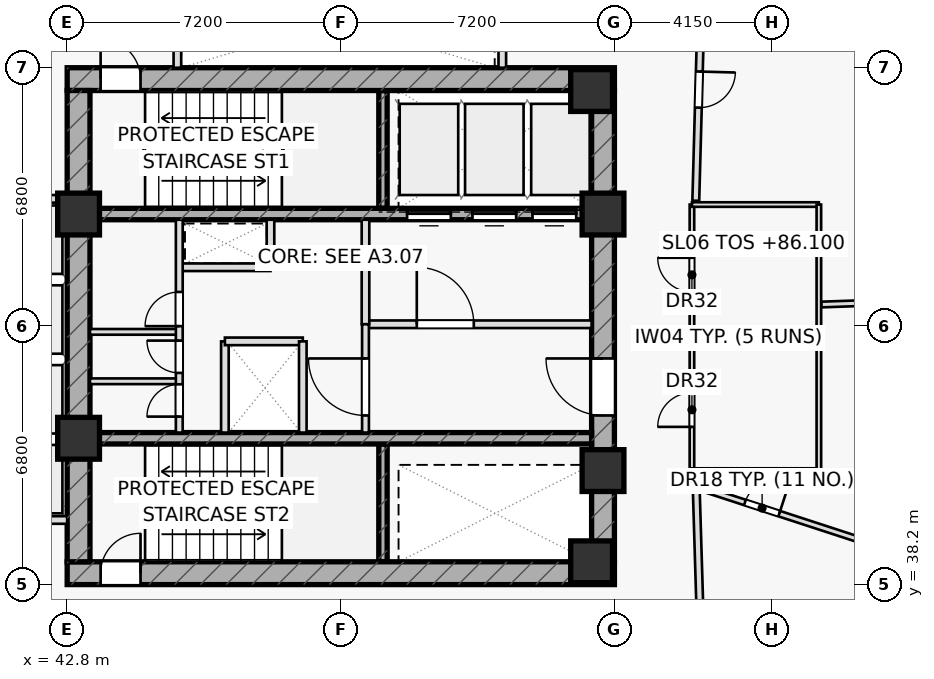
"""IFC4 building model, lengths in metres.
Left out: names, types, materials, properties, quantities, classifications, styles, units other than length and angle.
Written with IfcOpenShell. Run it as: python <this file> out.ifc"""

import sys

from ifc_helpers import new_model, si_unit, direction, frame, frame_2d, origin, origin_2d, place, context, subcontext, project, spatial, rectangle, extrude, element, fill, save


model = new_model("IFC4")
c1 = context("Model", 3, precision=1e-05, world=origin(), true_north=direction((0.0, 1.0)))
c2 = subcontext(c1, "Body", "Model", "MODEL_VIEW")
j1 = project(units=[si_unit("LENGTHUNIT", "METRE"), si_unit("PLANEANGLEUNIT", "RADIAN")], contexts=[c1])
p1 = place(None, origin())
s1 = spatial("IfcSite", under=j1, at=p1, CompositionType="ELEMENT")
p2 = place(p1, origin())
s2 = spatial("IfcBuilding", under=s1, at=p2, CompositionType="ELEMENT")
p3 = place(p2, frame((0.0, 0.0, 86.1)))
s3 = spatial("IfcBuildingStorey", under=s2, at=p3, CompositionType="ELEMENT", Elevation=86.1)
for number, where, z_axis, x_axis in (
    (1, (51.11, 48.1, 0.0), (0.0, 0.0, 1.0), (0.0, 1.0, 0.0)),
    (2, (51.11, 38.8, 0.0), (0.0, 0.0, 1.0), (0.0, 1.0, 0.0)),
):
    element("IfcWall", number, at=place(p3, frame(where, z_axis=z_axis, x_axis=x_axis)), inside=s3, PredefinedType="SHEAR", context=c2, shape_type="SweptSolid", body=[
        extrude(rectangle(XDim=3.1, YDim=0.22, at=frame_2d((1.55, 0.0))), origin(), (0.0, 0.0, 1.0), 3.6),
    ])
p4 = place(p3, frame((42.8, 51.5, 0.0), z_axis=(0.0, 0.0, 1.0), x_axis=(1.0, 0.0, 0.0)))
e3 = element("IfcWall", 3, at=p4, inside=s3, PredefinedType="SHEAR", context=c2, shape_type="SweptSolid", body=[
    extrude(rectangle(XDim=14.4, YDim=0.6, at=frame_2d((7.2, 0.0))), origin(), (0.0, 0.0, 1.0), 3.6),
])
p5 = place(p4, frame((0.88, 0.0, 0.0)))
e4 = element("IfcOpeningElement", 4, at=p5, cuts=e3, PredefinedType="OPENING", context=c2, shape_type="SweptSolid", body=[
    extrude(rectangle(XDim=1.05, YDim=2.2, at=frame_2d((0.525, 1.1))), frame((0.0, 0.31, 0.0), z_axis=(0.0, -1.0, 0.0), x_axis=(1.0, 0.0, 0.0)), (0.0, 0.0, 1.0), 0.62),
])
p6 = place(p3, frame((42.8, 38.5, 0.0), z_axis=(0.0, 0.0, 1.0), x_axis=(1.0, 0.0, 0.0)))
e5 = element("IfcWall", 5, at=p6, inside=s3, PredefinedType="SHEAR", context=c2, shape_type="SweptSolid", body=[
    extrude(rectangle(XDim=14.4, YDim=0.6, at=frame_2d((7.2, 0.0))), origin(), (0.0, 0.0, 1.0), 3.6),
])
p7 = place(p6, frame((0.88, 0.0, 0.0)))
e6 = element("IfcOpeningElement", 6, at=p7, cuts=e5, PredefinedType="OPENING", context=c2, shape_type="SweptSolid", body=[
    extrude(rectangle(XDim=1.05, YDim=2.2, at=frame_2d((0.525, 1.1))), frame((0.0, 0.31, 0.0), z_axis=(0.0, -1.0, 0.0), x_axis=(1.0, 0.0, 0.0)), (0.0, 0.0, 1.0), 0.62),
])
p8 = place(p3, frame((43.1, 38.8, 0.0), z_axis=(0.0, 0.0, 1.0), x_axis=(0.0, 1.0, 0.0)))
e7 = element("IfcWall", 7, at=p8, inside=s3, PredefinedType="SHEAR", context=c2, shape_type="SweptSolid", body=[
    extrude(rectangle(XDim=12.4, YDim=0.6, at=frame_2d((6.2, 0.0))), origin(), (0.0, 0.0, 1.0), 3.6),
])
p9 = place(p3, frame((56.9, 38.8, 0.0), z_axis=(0.0, 0.0, 1.0), x_axis=(0.0, 1.0, 0.0)))
e8 = element("IfcWall", 8, at=p9, inside=s3, PredefinedType="SHEAR", context=c2, shape_type="SweptSolid", body=[
    extrude(rectangle(XDim=12.4, YDim=0.6, at=frame_2d((6.2, 0.0))), origin(), (0.0, 0.0, 1.0), 3.6),
])
p10 = place(p9, frame((3.85, 0.0, 0.0)))
e9 = element("IfcOpeningElement", 9, at=p10, cuts=e8, PredefinedType="OPENING", context=c2, shape_type="SweptSolid", body=[
    extrude(rectangle(XDim=1.5, YDim=2.2, at=frame_2d((0.75, 1.1))), frame((0.0, 0.31, 0.0), z_axis=(0.0, -1.0, 0.0), x_axis=(1.0, 0.0, 0.0)), (0.0, 0.0, 1.0), 0.62),
])
p11 = place(p3, frame((43.4, 47.95, 0.0), z_axis=(0.0, 0.0, 1.0), x_axis=(1.0, 0.0, 0.0)))
e10 = element("IfcWall", 10, at=p11, inside=s3, PredefinedType="SHEAR", context=c2, shape_type="SweptSolid", body=[
    extrude(rectangle(XDim=13.2, YDim=0.3, at=frame_2d((6.6, 0.0))), origin(), (0.0, 0.0, 1.0), 3.6),
])
p12 = place(p11, frame((8.345, 0.0, 0.0)))
e11 = element("IfcOpeningElement", 11, at=p12, cuts=e10, PredefinedType="OPENING", context=c2, shape_type="SweptSolid", body=[
    extrude(rectangle(XDim=1.15, YDim=2.2, at=frame_2d((0.575, 1.1))), frame((0.0, 0.16, 0.0), z_axis=(0.0, -1.0, 0.0), x_axis=(1.0, 0.0, 0.0)), (0.0, 0.0, 1.0), 0.32),
])
p13 = place(p11, frame((10.065, 0.0, 0.0)))
e12 = element("IfcOpeningElement", 12, at=p13, cuts=e10, PredefinedType="OPENING", context=c2, shape_type="SweptSolid", body=[
    extrude(rectangle(XDim=1.15, YDim=2.2, at=frame_2d((0.575, 1.1))), frame((0.0, 0.16, 0.0), z_axis=(0.0, -1.0, 0.0), x_axis=(1.0, 0.0, 0.0)), (0.0, 0.0, 1.0), 0.32),
])
p14 = place(p11, frame((11.645, 0.0, 0.0)))
e13 = element("IfcOpeningElement", 13, at=p14, cuts=e10, PredefinedType="OPENING", context=c2, shape_type="SweptSolid", body=[
    extrude(rectangle(XDim=1.15, YDim=2.2, at=frame_2d((0.575, 1.1))), frame((0.0, 0.16, 0.0), z_axis=(0.0, -1.0, 0.0), x_axis=(1.0, 0.0, 0.0)), (0.0, 0.0, 1.0), 0.32),
])
p15 = place(p3, frame((43.4, 42.05, 0.0), z_axis=(0.0, 0.0, 1.0), x_axis=(1.0, 0.0, 0.0)))
e14 = element("IfcWall", 14, at=p15, inside=s3, PredefinedType="SHEAR", context=c2, shape_type="SweptSolid", body=[
    extrude(rectangle(XDim=13.2, YDim=0.3, at=frame_2d((6.6, 0.0))), origin(), (0.0, 0.0, 1.0), 3.6),
])
for number, where, z_axis, x_axis in (
    (15, (43.1, 47.95, 0.0), (0.0, 0.0, 1.0), (1.0, 0.0, 0.0)),
    (16, (56.9, 47.95, 0.0), (0.0, 0.0, 1.0), (1.0, 0.0, 0.0)),
    (17, (56.6, 51.2, 0.0), (0.0, 0.0, 1.0), (1.0, 0.0, 0.0)),
    (18, (43.1, 42.05, 0.0), (0.0, 0.0, 1.0), (1.0, 0.0, 0.0)),
    (19, (56.9, 41.2, 0.0), (0.0, 0.0, 1.0), (1.0, 0.0, 0.0)),
    (20, (56.6, 38.8, 0.0), (0.0, 0.0, 1.0), (1.0, 0.0, 0.0)),
):
    element("IfcColumn", number, at=place(p3, frame(where, z_axis=z_axis, x_axis=x_axis)), inside=s3, PredefinedType="COLUMN", context=c2, shape_type="SweptSolid", body=[
        extrude(rectangle(XDim=1.1, YDim=1.1, at=origin_2d()), origin(), (0.0, 0.0, 1.0), 3.6),
    ])
for number, where, z_axis, x_axis in (
    (21, (40.3, 39.9, 0.0), (0.0, 0.0, 1.0), (1.0, 0.0, 0.0)),
    (22, (40.3, 48.35, 0.0), (0.0, 0.0, 1.0), (1.0, 0.0, 0.0)),
    (23, (45.7, 51.8, 0.0), (0.0, 0.0, 1.0), (0.0, 1.0, 0.0)),
    (24, (54.25, 51.8, 0.0), (0.0, 0.0, 1.0), (0.0, 1.0, 0.0)),
):
    element("IfcWall", number, at=place(p3, frame(where, z_axis=z_axis, x_axis=x_axis)), inside=s3, PredefinedType="PARTITIONING", context=c2, shape_type="SweptSolid", body=[
        extrude(rectangle(XDim=2.5, YDim=0.2, at=frame_2d((1.25, 0.0))), origin(), (0.0, 0.0, 1.0), 3.6),
    ])
p16 = place(p3, frame((45.75, 46.55, 0.0), z_axis=(0.0, 0.0, 1.0), x_axis=(1.0, 0.0, 0.0)))
e25 = element("IfcWall", 25, at=p16, inside=s3, PredefinedType="PARTITIONING", context=c2, shape_type="SweptSolid", body=[
    extrude(rectangle(XDim=2.4, YDim=0.2, at=frame_2d((1.2, 0.0))), origin(), (0.0, 0.0, 1.0), 3.6),
])
p17 = place(p3, frame((48.15, 46.55, 0.0), z_axis=(0.0, 0.0, 1.0), x_axis=(0.0, 1.0, 0.0)))
e26 = element("IfcWall", 26, at=p17, inside=s3, PredefinedType="PARTITIONING", context=c2, shape_type="SweptSolid", body=[
    extrude(rectangle(XDim=1.25, YDim=0.2, at=frame_2d((0.625, 0.0))), origin(), (0.0, 0.0, 1.0), 3.6),
])
p18 = place(p3, frame((46.95, 42.2, 0.0), z_axis=(0.0, 0.0, 1.0), x_axis=(0.0, 1.0, 0.0)))
e27 = element("IfcWall", 27, at=p18, inside=s3, PredefinedType="PARTITIONING", context=c2, shape_type="SweptSolid", body=[
    extrude(rectangle(XDim=2.4, YDim=0.2, at=frame_2d((1.2, 0.0))), origin(), (0.0, 0.0, 1.0), 3.6),
])
p19 = place(p3, frame((46.95, 44.6, 0.0), z_axis=(0.0, 0.0, 1.0), x_axis=(1.0, 0.0, 0.0)))
e28 = element("IfcWall", 28, at=p19, inside=s3, PredefinedType="PARTITIONING", context=c2, shape_type="SweptSolid", body=[
    extrude(rectangle(XDim=2.05, YDim=0.2, at=frame_2d((1.025, 0.0))), origin(), (0.0, 0.0, 1.0), 3.6),
])
p20 = place(p3, frame((50.65, 45.05, 0.0), z_axis=(0.0, 0.0, 1.0), x_axis=(1.0, 0.0, 0.0)))
e29 = element("IfcWall", 29, at=p20, inside=s3, PredefinedType="PARTITIONING", context=c2, shape_type="SweptSolid", body=[
    extrude(rectangle(XDim=5.95, YDim=0.2, at=frame_2d((2.975, 0.0))), origin(), (0.0, 0.0, 1.0), 3.6),
])
p21 = place(p20, frame((1.35, 0.0, 0.0)))
e30 = element("IfcOpeningElement", 30, at=p21, cuts=e29, PredefinedType="OPENING", context=c2, shape_type="SweptSolid", body=[
    extrude(rectangle(XDim=1.5, YDim=2.2, at=frame_2d((0.75, 1.1))), frame((0.0, 0.11, 0.0), z_axis=(0.0, -1.0, 0.0), x_axis=(1.0, 0.0, 0.0)), (0.0, 0.0, 1.0), 0.22),
])
p22 = place(p3, frame((50.65, 45.05, 0.0), z_axis=(0.0, 0.0, 1.0), x_axis=(0.0, 1.0, 0.0)))
e31 = element("IfcWall", 31, at=p22, inside=s3, PredefinedType="PARTITIONING", context=c2, shape_type="SweptSolid", body=[
    extrude(rectangle(XDim=2.75, YDim=0.2, at=frame_2d((1.375, 0.0))), origin(), (0.0, 0.0, 1.0), 3.6),
])
p23 = place(p3, frame((50.65, 42.2, 0.0), z_axis=(0.0, 0.0, 1.0), x_axis=(0.0, 1.0, 0.0)))
e32 = element("IfcWall", 32, at=p23, inside=s3, PredefinedType="PARTITIONING", context=c2, shape_type="SweptSolid", body=[
    extrude(rectangle(XDim=2.85, YDim=0.18, at=frame_2d((1.425, 0.0))), origin(), (0.0, 0.0, 1.0), 3.6),
])
p24 = place(p23, frame((0.45, 0.0, 0.0)))
e33 = element("IfcOpeningElement", 33, at=p24, cuts=e32, PredefinedType="OPENING", context=c2, shape_type="SweptSolid", body=[
    extrude(rectangle(XDim=1.5, YDim=2.2, at=frame_2d((0.75, 1.1))), frame((0.0, 0.1, 0.0), z_axis=(0.0, -1.0, 0.0), x_axis=(1.0, 0.0, 0.0)), (0.0, 0.0, 1.0), 0.2),
])
for number, where, z_axis, x_axis in (
    (34, (43.4, 43.55, 0.0), (0.0, 0.0, 1.0), (1.0, 0.0, 0.0)),
    (35, (43.4, 44.85, 0.0), (0.0, 0.0, 1.0), (1.0, 0.0, 0.0)),
):
    element("IfcWall", number, at=place(p3, frame(where, z_axis=z_axis, x_axis=x_axis)), inside=s3, PredefinedType="PARTITIONING", context=c2, shape_type="SweptSolid", body=[
        extrude(rectangle(XDim=2.35, YDim=0.15, at=frame_2d((1.175, 0.0))), origin(), (0.0, 0.0, 1.0), 3.6),
    ])
p25 = place(p3, frame((45.75, 42.2, 0.0), z_axis=(0.0, 0.0, 1.0), x_axis=(0.0, 1.0, 0.0)))
e36 = element("IfcWall", 36, at=p25, inside=s3, PredefinedType="PARTITIONING", context=c2, shape_type="SweptSolid", body=[
    extrude(rectangle(XDim=5.6, YDim=0.18, at=frame_2d((2.8, 0.0))), origin(), (0.0, 0.0, 1.0), 3.6),
])
p26 = place(p25, frame((0.42, 0.0, 0.0)))
e37 = element("IfcOpeningElement", 37, at=p26, cuts=e36, PredefinedType="OPENING", context=c2, shape_type="SweptSolid", body=[
    extrude(rectangle(XDim=0.85, YDim=2.05, at=frame_2d((0.425, 1.025))), frame((0.0, 0.1, 0.0), z_axis=(0.0, -1.0, 0.0), x_axis=(1.0, 0.0, 0.0)), (0.0, 0.0, 1.0), 0.2),
])
p27 = place(p25, frame((1.57, 0.0, 0.0)))
e38 = element("IfcOpeningElement", 38, at=p27, cuts=e36, PredefinedType="OPENING", context=c2, shape_type="SweptSolid", body=[
    extrude(rectangle(XDim=0.85, YDim=2.05, at=frame_2d((0.425, 1.025))), frame((0.0, 0.1, 0.0), z_axis=(0.0, -1.0, 0.0), x_axis=(1.0, 0.0, 0.0)), (0.0, 0.0, 1.0), 0.2),
])
p28 = place(p25, frame((2.8, 0.0, 0.0)))
e39 = element("IfcOpeningElement", 39, at=p28, cuts=e36, PredefinedType="OPENING", context=c2, shape_type="SweptSolid", body=[
    extrude(rectangle(XDim=0.9, YDim=2.05, at=frame_2d((0.45, 1.025))), frame((0.0, 0.1, 0.0), z_axis=(0.0, -1.0, 0.0), x_axis=(1.0, 0.0, 0.0)), (0.0, 0.0, 1.0), 0.2),
])
p29 = place(p3, frame((59.24, 41.2, 0.0), z_axis=(0.0, 0.0, 1.0), x_axis=(0.0, 1.0, 0.0)))
e40 = element("IfcWall", 40, at=p29, inside=s3, PredefinedType="PARTITIONING", context=c2, shape_type="SweptSolid", body=[
    extrude(rectangle(XDim=7.0, YDim=0.12, at=frame_2d((3.5, 0.0))), origin(), (0.0, 0.0, 1.0), 3.6),
])
p30 = place(p29, frame((1.15, 0.0, 0.0)))
e41 = element("IfcOpeningElement", 41, at=p30, cuts=e40, PredefinedType="OPENING", context=c2, shape_type="SweptSolid", body=[
    extrude(rectangle(XDim=0.9, YDim=2.05, at=frame_2d((0.45, 1.025))), frame((0.0, 0.07, 0.0), z_axis=(0.0, -1.0, 0.0), x_axis=(1.0, 0.0, 0.0)), (0.0, 0.0, 1.0), 0.14),
])
p31 = place(p29, frame((4.7, 0.0, 0.0)))
e42 = element("IfcOpeningElement", 42, at=p31, cuts=e40, PredefinedType="OPENING", context=c2, shape_type="SweptSolid", body=[
    extrude(rectangle(XDim=0.9, YDim=2.05, at=frame_2d((0.45, 1.025))), frame((0.0, 0.07, 0.0), z_axis=(0.0, -1.0, 0.0), x_axis=(1.0, 0.0, 0.0)), (0.0, 0.0, 1.0), 0.14),
])
p32 = place(p3, frame((59.24, 41.2, 0.0), z_axis=(0.0, 0.0, 1.0), x_axis=(1.0, 0.0, 0.0)))
e43 = element("IfcWall", 43, at=p32, inside=s3, PredefinedType="PARTITIONING", context=c2, shape_type="SweptSolid", body=[
    extrude(rectangle(XDim=3.34, YDim=0.12, at=frame_2d((1.67, 0.0))), origin(), (0.0, 0.0, 1.0), 2.975),
])
for number, where, z_axis, x_axis in (
    (44, (59.24, 44.65, 0.0), (0.0, 0.0, 1.0), (1.0, 0.0, 0.0)),
    (45, (59.24, 48.2, 0.0), (0.0, 0.0, 1.0), (1.0, 0.0, 0.0)),
):
    element("IfcWall", number, at=place(p3, frame(where, z_axis=z_axis, x_axis=x_axis)), inside=s3, PredefinedType="PARTITIONING", context=c2, shape_type="SweptSolid", body=[
        extrude(rectangle(XDim=3.34, YDim=0.12, at=frame_2d((1.67, 0.0))), origin(), (0.0, 0.0, 1.0), 3.6),
    ])
p33 = place(p3, frame((62.58, 41.2, 0.0), z_axis=(0.0, 0.0, 1.0), x_axis=(0.0, 1.0, 0.0)))
e46 = element("IfcWall", 46, at=p33, inside=s3, PredefinedType="PARTITIONING", context=c2, shape_type="SweptSolid", body=[
    extrude(rectangle(XDim=7.0, YDim=0.12, at=frame_2d((3.5, 0.0))), origin(), (0.0, 0.0, 1.0), 3.6),
])
p34 = place(p3, frame((59.351, 40.779, 0.0), z_axis=(0.0, 0.0, 1.0), x_axis=(0.950783281681, -0.309856662468, 0.0)))
e47 = element("IfcWall", 47, at=p34, inside=s3, PredefinedType="PARTITIONING", context=c2, shape_type="SweptSolid", body=[
    extrude(rectangle(XDim=18.495, YDim=0.15, at=frame_2d((9.247, 0.0))), origin(), (0.0, 0.0, 1.0), 2.975),
])
p35 = place(p34, frame((1.35, 0.0, 0.0)))
e48 = element("IfcOpeningElement", 48, at=p35, cuts=e47, PredefinedType="OPENING", context=c2, shape_type="SweptSolid", body=[
    extrude(rectangle(XDim=0.95, YDim=2.05, at=frame_2d((0.475, 1.025))), frame((0.0, 0.085, 0.0), z_axis=(0.0, -1.0, 0.0), x_axis=(1.0, 0.0, 0.0)), (0.0, 0.0, 1.0), 0.17),
])
p36 = place(p3, frame((62.65, 45.569, 0.0), z_axis=(0.0, 0.0, 1.0), x_axis=(0.999386624809, 0.035019625243, 0.0)))
e49 = element("IfcWall", 49, at=p36, inside=s3, PredefinedType="PARTITIONING", context=c2, shape_type="SweptSolid", body=[
    extrude(rectangle(XDim=11.496, YDim=0.15, at=frame_2d((5.748, 0.0))), origin(), (0.0, 0.0, 1.0), 3.025),
])
p37 = place(p3, frame((59.501, 54.15, 0.0), z_axis=(0.0, 0.0, 1.0), x_axis=(-0.027367567602, -0.999625437973, 0.0)))
e50 = element("IfcWall", 50, at=p37, inside=s3, PredefinedType="PARTITIONING", context=c2, shape_type="SweptSolid", body=[
    extrude(rectangle(XDim=5.852, YDim=0.18, at=frame_2d((2.926, 0.0))), origin(), (0.0, 0.0, 1.0), 2.975),
])
p38 = place(p37, frame((2.451, 0.0, 0.0)))
e51 = element("IfcOpeningElement", 51, at=p38, cuts=e50, PredefinedType="OPENING", context=c2, shape_type="SweptSolid", body=[
    extrude(rectangle(XDim=0.95, YDim=2.05, at=frame_2d((0.475, 1.025))), frame((0.0, 0.1, 0.0), z_axis=(0.0, -1.0, 0.0), x_axis=(1.0, 0.0, 0.0)), (0.0, 0.0, 1.0), 0.2),
])
p39 = place(p3, frame((59.342, 41.1, 0.0), z_axis=(0.0, 0.0, 1.0), x_axis=(0.030445329425, -0.999536433511, 0.0)))
e52 = element("IfcWall", 52, at=p39, inside=s3, PredefinedType="PARTITIONING", context=c2, shape_type="SweptSolid", body=[
    extrude(rectangle(XDim=5.252, YDim=0.18, at=frame_2d((2.626, 0.0))), origin(), (0.0, 0.0, 1.0), 2.975),
])
p40 = place(p3, frame((49.0, 42.2, 0.0), z_axis=(0.0, 0.0, 1.0), x_axis=(0.0, 1.0, 0.0)))
e53 = element("IfcWall", 53, at=p40, inside=s3, PredefinedType="PARTITIONING", context=c2, shape_type="SweptSolid", body=[
    extrude(rectangle(XDim=2.4, YDim=0.2, at=frame_2d((1.2, 0.0))), origin(), (0.0, 0.0, 1.0), 3.6),
])
p41 = place(p5, origin())
e54 = element("IfcDoor", 54, at=p41, inside=s3, OperationType="SINGLE_SWING_LEFT", PredefinedType="DOOR", context=c2, shape_type="SweptSolid", body=[
    extrude(rectangle(XDim=1.05, YDim=2.2, at=frame_2d((0.525, 1.1))), frame((0.0, 0.025, 0.0), z_axis=(0.0, -1.0, 0.0), x_axis=(1.0, 0.0, 0.0)), (0.0, 0.0, 1.0), 0.05),
])
fill(e4, e54)
p42 = place(p7, origin())
e55 = element("IfcDoor", 55, at=p42, inside=s3, OperationType="SINGLE_SWING_RIGHT", PredefinedType="DOOR", context=c2, shape_type="SweptSolid", body=[
    extrude(rectangle(XDim=1.05, YDim=2.2, at=frame_2d((0.525, 1.1))), frame((0.0, 0.025, 0.0), z_axis=(0.0, -1.0, 0.0), x_axis=(1.0, 0.0, 0.0)), (0.0, 0.0, 1.0), 0.05),
])
fill(e6, e55)
p43 = place(p10, origin())
e56 = element("IfcDoor", 56, at=p43, inside=s3, OperationType="SINGLE_SWING_RIGHT", PredefinedType="DOOR", context=c2, shape_type="SweptSolid", body=[
    extrude(rectangle(XDim=1.5, YDim=2.2, at=frame_2d((0.75, 1.1))), frame((0.0, 0.025, 0.0), z_axis=(0.0, -1.0, 0.0), x_axis=(1.0, 0.0, 0.0)), (0.0, 0.0, 1.0), 0.05),
])
fill(e9, e56)
p44 = place(p21, origin())
e57 = element("IfcDoor", 57, at=p44, inside=s3, OperationType="SINGLE_SWING_LEFT", PredefinedType="DOOR", context=c2, shape_type="SweptSolid", body=[
    extrude(rectangle(XDim=1.5, YDim=2.2, at=frame_2d((0.75, 1.1))), frame((0.0, 0.025, 0.0), z_axis=(0.0, -1.0, 0.0), x_axis=(1.0, 0.0, 0.0)), (0.0, 0.0, 1.0), 0.05),
])
fill(e30, e57)
p45 = place(p24, origin())
e58 = element("IfcDoor", 58, at=p45, inside=s3, OperationType="SINGLE_SWING_RIGHT", PredefinedType="DOOR", context=c2, shape_type="SweptSolid", body=[
    extrude(rectangle(XDim=1.5, YDim=2.2, at=frame_2d((0.75, 1.1))), frame((0.0, 0.025, 0.0), z_axis=(0.0, -1.0, 0.0), x_axis=(1.0, 0.0, 0.0)), (0.0, 0.0, 1.0), 0.05),
])
fill(e33, e58)
p46 = place(p26, origin())
e59 = element("IfcDoor", 59, at=p46, inside=s3, OperationType="SINGLE_SWING_LEFT", PredefinedType="DOOR", context=c2, shape_type="SweptSolid", body=[
    extrude(rectangle(XDim=0.85, YDim=2.05, at=frame_2d((0.425, 1.025))), frame((0.0, 0.025, 0.0), z_axis=(0.0, -1.0, 0.0), x_axis=(1.0, 0.0, 0.0)), (0.0, 0.0, 1.0), 0.05),
])
fill(e37, e59)
p47 = place(p27, origin())
e60 = element("IfcDoor", 60, at=p47, inside=s3, OperationType="SINGLE_SWING_RIGHT", PredefinedType="DOOR", context=c2, shape_type="SweptSolid", body=[
    extrude(rectangle(XDim=0.85, YDim=2.05, at=frame_2d((0.425, 1.025))), frame((0.0, 0.025, 0.0), z_axis=(0.0, -1.0, 0.0), x_axis=(1.0, 0.0, 0.0)), (0.0, 0.0, 1.0), 0.05),
])
fill(e38, e60)
p48 = place(p28, origin())
e61 = element("IfcDoor", 61, at=p48, inside=s3, OperationType="SINGLE_SWING_LEFT", PredefinedType="DOOR", context=c2, shape_type="SweptSolid", body=[
    extrude(rectangle(XDim=0.9, YDim=2.05, at=frame_2d((0.45, 1.025))), frame((0.0, 0.025, 0.0), z_axis=(0.0, -1.0, 0.0), x_axis=(1.0, 0.0, 0.0)), (0.0, 0.0, 1.0), 0.05),
])
fill(e39, e61)
p49 = place(p30, origin())
e62 = element("IfcDoor", 62, at=p49, inside=s3, OperationType="SINGLE_SWING_LEFT", PredefinedType="DOOR", context=c2, shape_type="SweptSolid", body=[
    extrude(rectangle(XDim=0.9, YDim=2.05, at=frame_2d((0.45, 1.025))), frame((0.0, 0.025, 0.0), z_axis=(0.0, -1.0, 0.0), x_axis=(1.0, 0.0, 0.0)), (0.0, 0.0, 1.0), 0.05),
])
fill(e41, e62)
p50 = place(p31, origin())
e63 = element("IfcDoor", 63, at=p50, inside=s3, OperationType="SINGLE_SWING_RIGHT", PredefinedType="DOOR", context=c2, shape_type="SweptSolid", body=[
    extrude(rectangle(XDim=0.9, YDim=2.05, at=frame_2d((0.45, 1.025))), frame((0.0, 0.025, 0.0), z_axis=(0.0, -1.0, 0.0), x_axis=(1.0, 0.0, 0.0)), (0.0, 0.0, 1.0), 0.05),
])
fill(e42, e63)
p51 = place(p35, origin())
e64 = element("IfcDoor", 64, at=p51, inside=s3, OperationType="SINGLE_SWING_RIGHT", PredefinedType="DOOR", context=c2, shape_type="SweptSolid", body=[
    extrude(rectangle(XDim=0.95, YDim=2.05, at=frame_2d((0.475, 1.025))), frame((0.0, 0.025, 0.0), z_axis=(0.0, -1.0, 0.0), x_axis=(1.0, 0.0, 0.0)), (0.0, 0.0, 1.0), 0.05),
])
fill(e48, e64)
p52 = place(p38, origin())
e65 = element("IfcDoor", 65, at=p52, inside=s3, OperationType="SINGLE_SWING_LEFT", PredefinedType="DOOR", context=c2, shape_type="SweptSolid", body=[
    extrude(rectangle(XDim=0.95, YDim=2.05, at=frame_2d((0.475, 1.025))), frame((0.0, 0.025, 0.0), z_axis=(0.0, -1.0, 0.0), x_axis=(1.0, 0.0, 0.0)), (0.0, 0.0, 1.0), 0.05),
])
fill(e51, e65)
p53 = place(p12, origin())
e66 = element("IfcDoor", 66, at=p53, inside=s3, OperationType="SLIDING_TO_LEFT", PredefinedType="DOOR", context=c2, shape_type="SweptSolid", body=[
    extrude(rectangle(XDim=1.15, YDim=2.2, at=frame_2d((0.575, 1.1))), frame((0.0, 0.025, 0.0), z_axis=(0.0, -1.0, 0.0), x_axis=(1.0, 0.0, 0.0)), (0.0, 0.0, 1.0), 0.05),
])
fill(e11, e66)
p54 = place(p13, origin())
e67 = element("IfcDoor", 67, at=p54, inside=s3, OperationType="SLIDING_TO_LEFT", PredefinedType="DOOR", context=c2, shape_type="SweptSolid", body=[
    extrude(rectangle(XDim=1.15, YDim=2.2, at=frame_2d((0.575, 1.1))), frame((0.0, 0.025, 0.0), z_axis=(0.0, -1.0, 0.0), x_axis=(1.0, 0.0, 0.0)), (0.0, 0.0, 1.0), 0.05),
])
fill(e12, e67)
p55 = place(p14, origin())
e68 = element("IfcDoor", 68, at=p55, inside=s3, OperationType="SLIDING_TO_LEFT", PredefinedType="DOOR", context=c2, shape_type="SweptSolid", body=[
    extrude(rectangle(XDim=1.15, YDim=2.2, at=frame_2d((0.575, 1.1))), frame((0.0, 0.025, 0.0), z_axis=(0.0, -1.0, 0.0), x_axis=(1.0, 0.0, 0.0)), (0.0, 0.0, 1.0), 0.05),
])
fill(e13, e68)
save(model, sys.argv[1])
